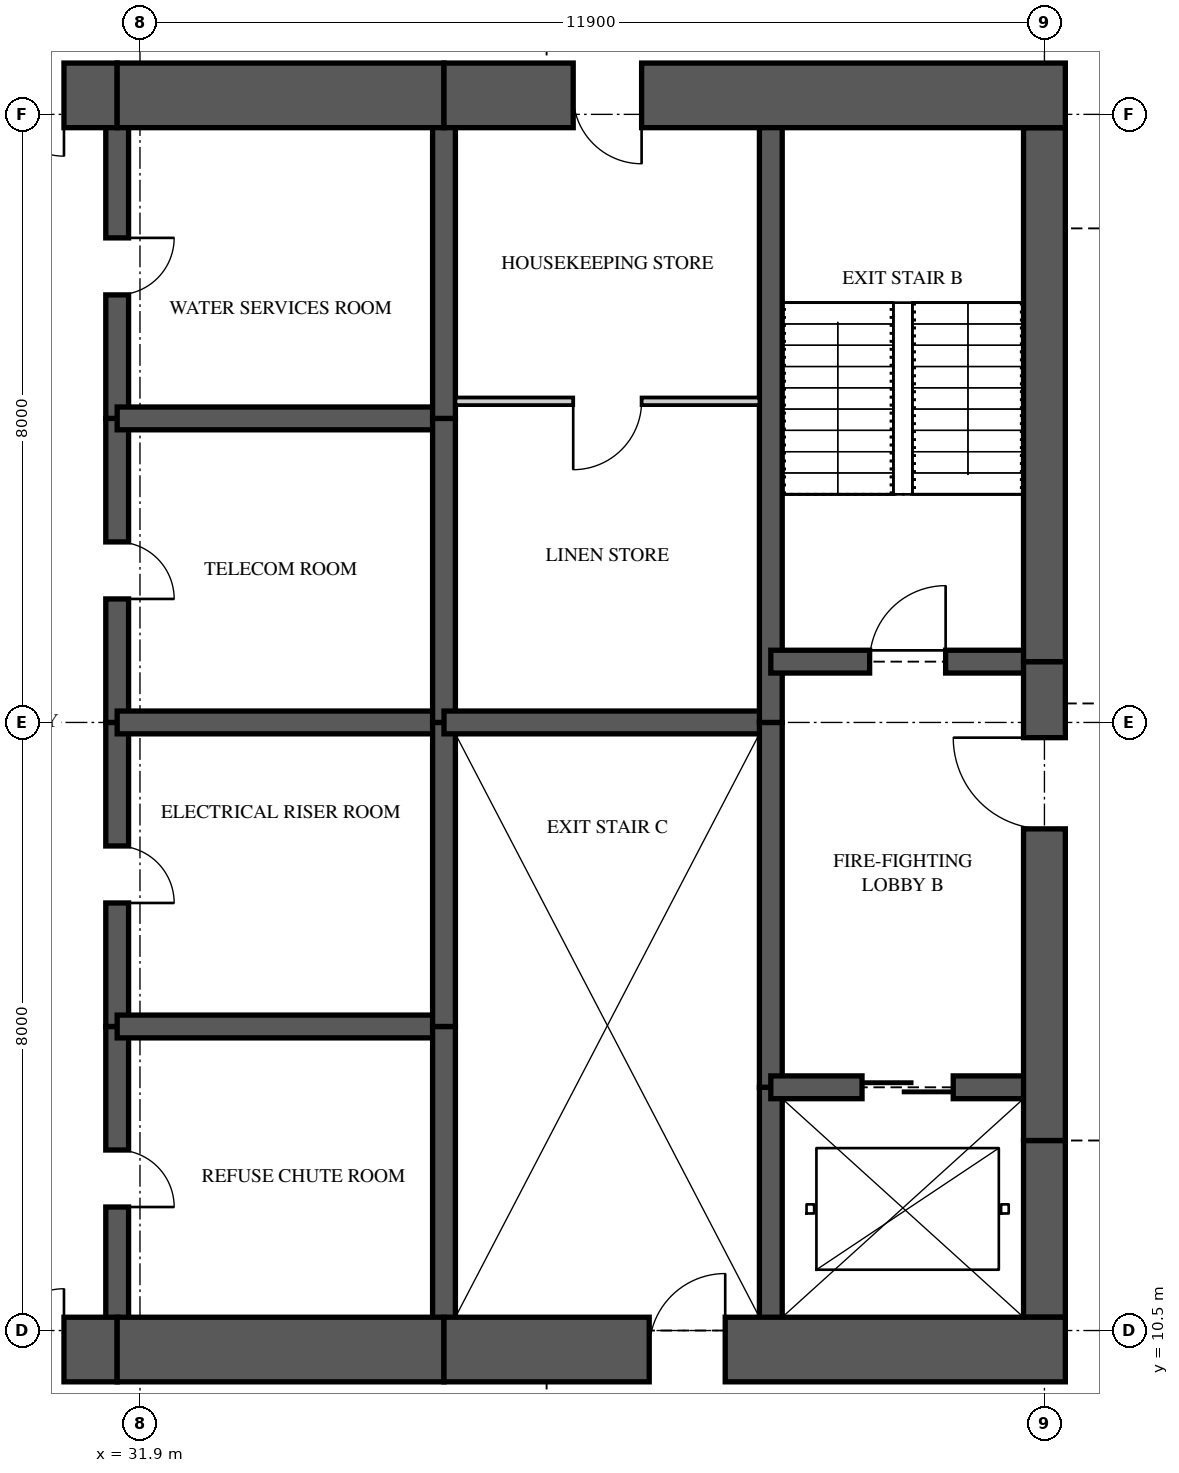
"""IFC4 building model, lengths in metres.
Left out: names, types, materials, properties, quantities, classifications, styles, units other than length and angle.
Written with IfcOpenShell. Run it as: python <this file> out.ifc"""

import sys

from ifc_helpers import new_model, si_unit, direction, frame, frame_2d, origin, place, context, subcontext, project, spatial, rectangle, extrude, element, fill, save


model = new_model("IFC4")
c1 = context("Model", 3, precision=1e-05, world=origin(), true_north=direction((0.0, 1.0)))
c2 = subcontext(c1, "Body", "Model", "MODEL_VIEW")
j1 = project(units=[si_unit("LENGTHUNIT", "METRE"), si_unit("PLANEANGLEUNIT", "RADIAN")], contexts=[c1])
p1 = place(None, origin())
s1 = spatial("IfcSite", under=j1, at=p1, CompositionType="ELEMENT")
p2 = place(p1, origin())
s2 = spatial("IfcBuilding", under=s1, at=p2, CompositionType="ELEMENT")
p3 = place(p2, frame((0.0, 0.0, 272.75)))
s3 = spatial("IfcBuildingStorey", under=s2, at=p3, CompositionType="ELEMENT", Elevation=272.75)
p4 = place(p3, frame((26.0, 10.25, 0.0), z_axis=(0.0, 0.0, 1.0), x_axis=(1.0, 0.0, 0.0)))
e1 = element("IfcWall", 1, at=p4, inside=s3, PredefinedType="SHEAR", context=c2, shape_type="SweptSolid", body=[
    extrude(rectangle(XDim=5.6, YDim=0.85, at=frame_2d((2.8, 0.0))), origin(), (0.0, 0.0, 1.0), 5.0),
])
p5 = place(p4, frame((3.3, 0.0, 0.0)))
e2 = element("IfcOpeningElement", 2, at=p5, cuts=e1, PredefinedType="OPENING", context=c2, shape_type="SweptSolid", body=[
    extrude(rectangle(XDim=1.6, YDim=2.1, at=frame_2d((0.8, 1.05))), frame((0.0, 0.435, 0.0), z_axis=(0.0, -1.0, 0.0), x_axis=(1.0, 0.0, 0.0)), (0.0, 0.0, 1.0), 0.87),
])
p6 = place(p3, frame((31.6, 10.25, 0.0), z_axis=(0.0, 0.0, 1.0), x_axis=(1.0, 0.0, 0.0)))
e3 = element("IfcWall", 3, at=p6, inside=s3, PredefinedType="SHEAR", context=c2, shape_type="SweptSolid", body=[
    extrude(rectangle(XDim=4.3, YDim=0.85, at=frame_2d((2.15, 0.0))), origin(), (0.0, 0.0, 1.0), 5.0),
])
p7 = place(p3, frame((35.9, 10.25, 0.0), z_axis=(0.0, 0.0, 1.0), x_axis=(1.0, 0.0, 0.0)))
e4 = element("IfcWall", 4, at=p7, inside=s3, PredefinedType="SHEAR", context=c2, shape_type="SweptSolid", body=[
    extrude(rectangle(XDim=8.175, YDim=0.85, at=frame_2d((4.087, 0.0))), origin(), (0.0, 0.0, 1.0), 5.0),
])
p8 = place(p7, frame((2.7, 0.0, 0.0)))
e5 = element("IfcOpeningElement", 5, at=p8, cuts=e4, PredefinedType="OPENING", context=c2, shape_type="SweptSolid", body=[
    extrude(rectangle(XDim=1.0, YDim=2.1, at=frame_2d((0.5, 1.05))), frame((0.0, 0.435, 0.0), z_axis=(0.0, -1.0, 0.0), x_axis=(1.0, 0.0, 0.0)), (0.0, 0.0, 1.0), 0.87),
])
p9 = place(p3, frame((44.075, 26.75, 0.0), z_axis=(0.0, 0.0, 1.0), x_axis=(-1.0, 0.0, 0.0)))
e6 = element("IfcWall", 6, at=p9, inside=s3, PredefinedType="SHEAR", context=c2, shape_type="SweptSolid", body=[
    extrude(rectangle(XDim=8.175, YDim=0.85, at=frame_2d((4.087, 0.0))), origin(), (0.0, 0.0, 1.0), 5.0),
])
p10 = place(p9, frame((5.575, 0.0, 0.0)))
e7 = element("IfcOpeningElement", 7, at=p10, cuts=e6, PredefinedType="OPENING", context=c2, shape_type="SweptSolid", body=[
    extrude(rectangle(XDim=0.9, YDim=2.1, at=frame_2d((0.45, 1.05))), frame((0.0, 0.435, 0.0), z_axis=(0.0, -1.0, 0.0), x_axis=(1.0, 0.0, 0.0)), (0.0, 0.0, 1.0), 0.87),
])
p11 = place(p3, frame((35.9, 26.75, 0.0), z_axis=(0.0, 0.0, 1.0), x_axis=(-1.0, 0.0, 0.0)))
e8 = element("IfcWall", 8, at=p11, inside=s3, PredefinedType="SHEAR", context=c2, shape_type="SweptSolid", body=[
    extrude(rectangle(XDim=4.3, YDim=0.85, at=frame_2d((2.15, 0.0))), origin(), (0.0, 0.0, 1.0), 5.0),
])
p12 = place(p3, frame((31.6, 26.75, 0.0), z_axis=(0.0, 0.0, 1.0), x_axis=(-1.0, 0.0, 0.0)))
e9 = element("IfcWall", 9, at=p12, inside=s3, PredefinedType="SHEAR", context=c2, shape_type="SweptSolid", body=[
    extrude(rectangle(XDim=5.6, YDim=0.85, at=frame_2d((2.8, 0.0))), origin(), (0.0, 0.0, 1.0), 5.0),
])
p13 = place(p12, frame((0.7, 0.0, 0.0)))
e10 = element("IfcOpeningElement", 10, at=p13, cuts=e9, PredefinedType="OPENING", context=c2, shape_type="SweptSolid", body=[
    extrude(rectangle(XDim=1.6, YDim=2.1, at=frame_2d((0.8, 1.05))), frame((0.0, 0.435, 0.0), z_axis=(0.0, -1.0, 0.0), x_axis=(1.0, 0.0, 0.0)), (0.0, 0.0, 1.0), 0.87),
])
p14 = place(p3, frame((43.8, 10.675, 0.0), z_axis=(0.0, 0.0, 1.0), x_axis=(0.0, 1.0, 0.0)))
e11 = element("IfcWall", 11, at=p14, inside=s3, PredefinedType="SHEAR", context=c2, shape_type="SweptSolid", body=[
    extrude(rectangle(XDim=2.325, YDim=0.55, at=frame_2d((1.163, 0.0))), origin(), (0.0, 0.0, 1.0), 5.0),
])
p15 = place(p3, frame((43.8, 13.0, 0.0), z_axis=(0.0, 0.0, 1.0), x_axis=(0.0, 1.0, 0.0)))
e12 = element("IfcWall", 12, at=p15, inside=s3, PredefinedType="SHEAR", context=c2, shape_type="SweptSolid", body=[
    extrude(rectangle(XDim=6.3, YDim=0.55, at=frame_2d((3.15, 0.0))), origin(), (0.0, 0.0, 1.0), 5.0),
])
p16 = place(p15, frame((4.1, 0.0, 0.0)))
e13 = element("IfcOpeningElement", 13, at=p16, cuts=e12, PredefinedType="OPENING", context=c2, shape_type="SweptSolid", body=[
    extrude(rectangle(XDim=1.2, YDim=2.2, at=frame_2d((0.6, 1.1))), frame((0.0, 0.285, 0.0), z_axis=(0.0, -1.0, 0.0), x_axis=(1.0, 0.0, 0.0)), (0.0, 0.0, 1.0), 0.57),
])
p17 = place(p3, frame((43.8, 19.3, 0.0), z_axis=(0.0, 0.0, 1.0), x_axis=(0.0, 1.0, 0.0)))
e14 = element("IfcWall", 14, at=p17, inside=s3, PredefinedType="SHEAR", context=c2, shape_type="SweptSolid", body=[
    extrude(rectangle(XDim=7.025, YDim=0.55, at=frame_2d((3.512, 0.0))), origin(), (0.0, 0.0, 1.0), 5.0),
])
p18 = place(p3, frame((31.6, 10.25, 0.0), z_axis=(0.0, 0.0, 1.0), x_axis=(0.0, 1.0, 0.0)))
e15 = element("IfcWall", 15, at=p18, inside=s3, PredefinedType="SHEAR", context=c2, shape_type="SweptSolid", body=[
    extrude(rectangle(XDim=4.25, YDim=0.3, at=frame_2d((2.125, 0.0))), origin(), (0.0, 0.0, 1.0), 5.0),
])
p19 = place(p18, frame((1.875, 0.0, 0.0)))
e16 = element("IfcOpeningElement", 16, at=p19, cuts=e15, PredefinedType="OPENING", context=c2, shape_type="SweptSolid", body=[
    extrude(rectangle(XDim=0.75, YDim=2.1, at=frame_2d((0.375, 1.05))), frame((0.0, 0.16, 0.0), z_axis=(0.0, -1.0, 0.0), x_axis=(1.0, 0.0, 0.0)), (0.0, 0.0, 1.0), 0.32),
])
p20 = place(p3, frame((31.6, 14.5, 0.0), z_axis=(0.0, 0.0, 1.0), x_axis=(0.0, 1.0, 0.0)))
e17 = element("IfcWall", 17, at=p20, inside=s3, PredefinedType="SHEAR", context=c2, shape_type="SweptSolid", body=[
    extrude(rectangle(XDim=4.0, YDim=0.3, at=frame_2d((2.0, 0.0))), origin(), (0.0, 0.0, 1.0), 5.0),
])
p21 = place(p20, frame((1.625, 0.0, 0.0)))
e18 = element("IfcOpeningElement", 18, at=p21, cuts=e17, PredefinedType="OPENING", context=c2, shape_type="SweptSolid", body=[
    extrude(rectangle(XDim=0.75, YDim=2.1, at=frame_2d((0.375, 1.05))), frame((0.0, 0.16, 0.0), z_axis=(0.0, -1.0, 0.0), x_axis=(1.0, 0.0, 0.0)), (0.0, 0.0, 1.0), 0.32),
])
p22 = place(p3, frame((31.6, 18.5, 0.0), z_axis=(0.0, 0.0, 1.0), x_axis=(0.0, 1.0, 0.0)))
e19 = element("IfcWall", 19, at=p22, inside=s3, PredefinedType="SHEAR", context=c2, shape_type="SweptSolid", body=[
    extrude(rectangle(XDim=4.0, YDim=0.3, at=frame_2d((2.0, 0.0))), origin(), (0.0, 0.0, 1.0), 5.0),
])
p23 = place(p22, frame((1.625, 0.0, 0.0)))
e20 = element("IfcOpeningElement", 20, at=p23, cuts=e19, PredefinedType="OPENING", context=c2, shape_type="SweptSolid", body=[
    extrude(rectangle(XDim=0.75, YDim=2.1, at=frame_2d((0.375, 1.05))), frame((0.0, 0.16, 0.0), z_axis=(0.0, -1.0, 0.0), x_axis=(1.0, 0.0, 0.0)), (0.0, 0.0, 1.0), 0.32),
])
p24 = place(p3, frame((31.6, 22.5, 0.0), z_axis=(0.0, 0.0, 1.0), x_axis=(0.0, 1.0, 0.0)))
e21 = element("IfcWall", 21, at=p24, inside=s3, PredefinedType="SHEAR", context=c2, shape_type="SweptSolid", body=[
    extrude(rectangle(XDim=4.25, YDim=0.3, at=frame_2d((2.125, 0.0))), origin(), (0.0, 0.0, 1.0), 5.0),
])
p25 = place(p24, frame((1.625, 0.0, 0.0)))
e22 = element("IfcOpeningElement", 22, at=p25, cuts=e21, PredefinedType="OPENING", context=c2, shape_type="SweptSolid", body=[
    extrude(rectangle(XDim=0.75, YDim=2.1, at=frame_2d((0.375, 1.05))), frame((0.0, 0.16, 0.0), z_axis=(0.0, -1.0, 0.0), x_axis=(1.0, 0.0, 0.0)), (0.0, 0.0, 1.0), 0.32),
])
p26 = place(p3, frame((35.9, 10.25, 0.0), z_axis=(0.0, 0.0, 1.0), x_axis=(0.0, 1.0, 0.0)))
e23 = element("IfcWall", 23, at=p26, inside=s3, PredefinedType="SHEAR", context=c2, shape_type="SweptSolid", body=[
    extrude(rectangle(XDim=4.25, YDim=0.3, at=frame_2d((2.125, 0.0))), origin(), (0.0, 0.0, 1.0), 5.0),
])
for number, where, z_axis, x_axis in (
    (24, (35.9, 14.5, 0.0), (0.0, 0.0, 1.0), (0.0, 1.0, 0.0)),
    (25, (35.9, 18.5, 0.0), (0.0, 0.0, 1.0), (0.0, 1.0, 0.0)),
):
    element("IfcWall", number, at=place(p3, frame(where, z_axis=z_axis, x_axis=x_axis)), inside=s3, PredefinedType="SHEAR", context=c2, shape_type="SweptSolid", body=[
        extrude(rectangle(XDim=4.0, YDim=0.3, at=frame_2d((2.0, 0.0))), origin(), (0.0, 0.0, 1.0), 5.0),
    ])
p27 = place(p3, frame((35.9, 22.5, 0.0), z_axis=(0.0, 0.0, 1.0), x_axis=(0.0, 1.0, 0.0)))
e26 = element("IfcWall", 26, at=p27, inside=s3, PredefinedType="SHEAR", context=c2, shape_type="SweptSolid", body=[
    extrude(rectangle(XDim=4.25, YDim=0.3, at=frame_2d((2.125, 0.0))), origin(), (0.0, 0.0, 1.0), 5.0),
])
p28 = place(p3, frame((40.2, 10.25, 0.0), z_axis=(0.0, 0.0, 1.0), x_axis=(0.0, 1.0, 0.0)))
e27 = element("IfcWall", 27, at=p28, inside=s3, PredefinedType="SHEAR", context=c2, shape_type="SweptSolid", body=[
    extrude(rectangle(XDim=3.45, YDim=0.3, at=frame_2d((1.725, 0.0))), origin(), (0.0, 0.0, 1.0), 5.0),
])
p29 = place(p3, frame((40.2, 13.7, 0.0), z_axis=(0.0, 0.0, 1.0), x_axis=(0.0, 1.0, 0.0)))
e28 = element("IfcWall", 28, at=p29, inside=s3, PredefinedType="SHEAR", context=c2, shape_type="SweptSolid", body=[
    extrude(rectangle(XDim=4.8, YDim=0.3, at=frame_2d((2.4, 0.0))), origin(), (0.0, 0.0, 1.0), 5.0),
])
p30 = place(p3, frame((40.2, 18.5, 0.0), z_axis=(0.0, 0.0, 1.0), x_axis=(0.0, 1.0, 0.0)))
e29 = element("IfcWall", 29, at=p30, inside=s3, PredefinedType="SHEAR", context=c2, shape_type="SweptSolid", body=[
    extrude(rectangle(XDim=8.25, YDim=0.3, at=frame_2d((4.125, 0.0))), origin(), (0.0, 0.0, 1.0), 5.0),
])
for number, where, z_axis, x_axis in (
    (30, (31.6, 14.5, 0.0), (0.0, 0.0, 1.0), (1.0, 0.0, 0.0)),
    (31, (31.6, 18.5, 0.0), (0.0, 0.0, 1.0), (1.0, 0.0, 0.0)),
    (32, (31.6, 22.5, 0.0), (0.0, 0.0, 1.0), (1.0, 0.0, 0.0)),
):
    element("IfcWall", number, at=place(p3, frame(where, z_axis=z_axis, x_axis=x_axis)), inside=s3, PredefinedType="SHEAR", context=c2, shape_type="SweptSolid", body=[
        extrude(rectangle(XDim=4.3, YDim=0.3, at=frame_2d((2.15, 0.0))), origin(), (0.0, 0.0, 1.0), 5.0),
    ])
p31 = place(p3, frame((35.9, 18.5, 0.0), z_axis=(0.0, 0.0, 1.0), x_axis=(1.0, 0.0, 0.0)))
e33 = element("IfcWall", 33, at=p31, inside=s3, PredefinedType="SHEAR", context=c2, shape_type="SweptSolid", body=[
    extrude(rectangle(XDim=4.3, YDim=0.3, at=frame_2d((2.15, 0.0))), origin(), (0.0, 0.0, 1.0), 5.0),
])
p32 = place(p3, frame((40.2, 13.7, 0.0), z_axis=(0.0, 0.0, 1.0), x_axis=(1.0, 0.0, 0.0)))
e34 = element("IfcWall", 34, at=p32, inside=s3, PredefinedType="SHEAR", context=c2, shape_type="SweptSolid", body=[
    extrude(rectangle(XDim=3.6, YDim=0.3, at=frame_2d((1.8, 0.0))), origin(), (0.0, 0.0, 1.0), 5.0),
])
p33 = place(p32, frame((1.2, 0.0, 0.0)))
e35 = element("IfcOpeningElement", 35, at=p33, cuts=e34, PredefinedType="OPENING", context=c2, shape_type="SweptSolid", body=[
    extrude(rectangle(XDim=1.2, YDim=2.1, at=frame_2d((0.6, 1.05))), frame((0.0, 0.16, 0.0), z_axis=(0.0, -1.0, 0.0), x_axis=(1.0, 0.0, 0.0)), (0.0, 0.0, 1.0), 0.32),
])
p34 = place(p3, frame((40.2, 19.3, 0.0), z_axis=(0.0, 0.0, 1.0), x_axis=(1.0, 0.0, 0.0)))
e36 = element("IfcWall", 36, at=p34, inside=s3, PredefinedType="SHEAR", context=c2, shape_type="SweptSolid", body=[
    extrude(rectangle(XDim=3.6, YDim=0.3, at=frame_2d((1.8, 0.0))), origin(), (0.0, 0.0, 1.0), 5.0),
])
p35 = place(p34, frame((1.3, 0.0, 0.0)))
e37 = element("IfcOpeningElement", 37, at=p35, cuts=e36, PredefinedType="OPENING", context=c2, shape_type="SweptSolid", body=[
    extrude(rectangle(XDim=1.0, YDim=2.1, at=frame_2d((0.5, 1.05))), frame((0.0, 0.16, 0.0), z_axis=(0.0, -1.0, 0.0), x_axis=(1.0, 0.0, 0.0)), (0.0, 0.0, 1.0), 0.32),
])
p36 = place(p3, frame((36.05, 22.725, 0.0), z_axis=(0.0, 0.0, 1.0), x_axis=(1.0, 0.0, 0.0)))
e38 = element("IfcWall", 38, at=p36, inside=s3, PredefinedType="PARTITIONING", context=c2, shape_type="SweptSolid", body=[
    extrude(rectangle(XDim=4.0, YDim=0.1, at=frame_2d((2.0, 0.0))), origin(), (0.0, 0.0, 1.0), 4.72),
])
p37 = place(p36, frame((1.55, 0.0, 0.0)))
e39 = element("IfcOpeningElement", 39, at=p37, cuts=e38, PredefinedType="OPENING", context=c2, shape_type="SweptSolid", body=[
    extrude(rectangle(XDim=0.9, YDim=2.1, at=frame_2d((0.45, 1.05))), frame((0.0, 0.06, 0.0), z_axis=(0.0, -1.0, 0.0), x_axis=(1.0, 0.0, 0.0)), (0.0, 0.0, 1.0), 0.12),
])
p38 = place(p37, frame((0.9, 0.0, 0.0), z_axis=(0.0, 0.0, 1.0), x_axis=(-1.0, 0.0, 0.0)))
e40 = element("IfcDoor", 40, at=p38, inside=s3, OperationType="SINGLE_SWING_RIGHT", PredefinedType="DOOR", context=c2, shape_type="SweptSolid", body=[
    extrude(rectangle(XDim=0.9, YDim=2.1, at=frame_2d((0.45, 1.05))), frame((0.0, 0.025, 0.0), z_axis=(0.0, -1.0, 0.0), x_axis=(1.0, 0.0, 0.0)), (0.0, 0.0, 1.0), 0.05),
])
fill(e39, e40)
p39 = place(p35, origin())
e41 = element("IfcDoor", 41, at=p39, inside=s3, OperationType="SINGLE_SWING_RIGHT", PredefinedType="DOOR", context=c2, shape_type="SweptSolid", body=[
    extrude(rectangle(XDim=1.0, YDim=2.1, at=frame_2d((0.5, 1.05))), frame((0.0, 0.025, 0.0), z_axis=(0.0, -1.0, 0.0), x_axis=(1.0, 0.0, 0.0)), (0.0, 0.0, 1.0), 0.05),
])
fill(e37, e41)
p40 = place(p16, origin())
e42 = element("IfcDoor", 42, at=p40, inside=s3, OperationType="SINGLE_SWING_RIGHT", PredefinedType="DOOR", context=c2, shape_type="SweptSolid", body=[
    extrude(rectangle(XDim=1.2, YDim=2.2, at=frame_2d((0.6, 1.1))), frame((0.0, 0.025, 0.0), z_axis=(0.0, -1.0, 0.0), x_axis=(1.0, 0.0, 0.0)), (0.0, 0.0, 1.0), 0.05),
])
fill(e13, e42)
p41 = place(p33, origin())
e43 = element("IfcDoor", 43, at=p41, inside=s3, OperationType="SLIDING_TO_LEFT", PredefinedType="DOOR", context=c2, shape_type="SweptSolid", body=[
    extrude(rectangle(XDim=1.2, YDim=2.1, at=frame_2d((0.6, 1.05))), frame((0.0, 0.025, 0.0), z_axis=(0.0, -1.0, 0.0), x_axis=(1.0, 0.0, 0.0)), (0.0, 0.0, 1.0), 0.05),
])
fill(e35, e43)
p42 = place(p5, origin())
e44 = element("IfcDoor", 44, at=p42, inside=s3, OperationType="DOUBLE_DOOR_SINGLE_SWING", PredefinedType="DOOR", context=c2, shape_type="SweptSolid", body=[
    extrude(rectangle(XDim=1.6, YDim=2.1, at=frame_2d((0.8, 1.05))), frame((0.0, 0.025, 0.0), z_axis=(0.0, -1.0, 0.0), x_axis=(1.0, 0.0, 0.0)), (0.0, 0.0, 1.0), 0.05),
])
fill(e2, e44)
p43 = place(p13, origin())
e45 = element("IfcDoor", 45, at=p43, inside=s3, OperationType="DOUBLE_DOOR_SINGLE_SWING", PredefinedType="DOOR", context=c2, shape_type="SweptSolid", body=[
    extrude(rectangle(XDim=1.6, YDim=2.1, at=frame_2d((0.8, 1.05))), frame((0.0, 0.025, 0.0), z_axis=(0.0, -1.0, 0.0), x_axis=(1.0, 0.0, 0.0)), (0.0, 0.0, 1.0), 0.05),
])
fill(e10, e45)
p44 = place(p19, frame((0.75, 0.0, 0.0), z_axis=(0.0, 0.0, 1.0), x_axis=(-1.0, 0.0, 0.0)))
e46 = element("IfcDoor", 46, at=p44, inside=s3, OperationType="SINGLE_SWING_RIGHT", PredefinedType="DOOR", context=c2, shape_type="SweptSolid", body=[
    extrude(rectangle(XDim=0.75, YDim=2.1, at=frame_2d((0.375, 1.05))), frame((0.0, 0.025, 0.0), z_axis=(0.0, -1.0, 0.0), x_axis=(1.0, 0.0, 0.0)), (0.0, 0.0, 1.0), 0.05),
])
fill(e16, e46)
p45 = place(p21, frame((0.75, 0.0, 0.0), z_axis=(0.0, 0.0, 1.0), x_axis=(-1.0, 0.0, 0.0)))
e47 = element("IfcDoor", 47, at=p45, inside=s3, OperationType="SINGLE_SWING_RIGHT", PredefinedType="DOOR", context=c2, shape_type="SweptSolid", body=[
    extrude(rectangle(XDim=0.75, YDim=2.1, at=frame_2d((0.375, 1.05))), frame((0.0, 0.025, 0.0), z_axis=(0.0, -1.0, 0.0), x_axis=(1.0, 0.0, 0.0)), (0.0, 0.0, 1.0), 0.05),
])
fill(e18, e47)
p46 = place(p23, frame((0.75, 0.0, 0.0), z_axis=(0.0, 0.0, 1.0), x_axis=(-1.0, 0.0, 0.0)))
e48 = element("IfcDoor", 48, at=p46, inside=s3, OperationType="SINGLE_SWING_RIGHT", PredefinedType="DOOR", context=c2, shape_type="SweptSolid", body=[
    extrude(rectangle(XDim=0.75, YDim=2.1, at=frame_2d((0.375, 1.05))), frame((0.0, 0.025, 0.0), z_axis=(0.0, -1.0, 0.0), x_axis=(1.0, 0.0, 0.0)), (0.0, 0.0, 1.0), 0.05),
])
fill(e20, e48)
p47 = place(p25, frame((0.75, 0.0, 0.0), z_axis=(0.0, 0.0, 1.0), x_axis=(-1.0, 0.0, 0.0)))
e49 = element("IfcDoor", 49, at=p47, inside=s3, OperationType="SINGLE_SWING_LEFT", PredefinedType="DOOR", context=c2, shape_type="SweptSolid", body=[
    extrude(rectangle(XDim=0.75, YDim=2.1, at=frame_2d((0.375, 1.05))), frame((0.0, 0.025, 0.0), z_axis=(0.0, -1.0, 0.0), x_axis=(1.0, 0.0, 0.0)), (0.0, 0.0, 1.0), 0.05),
])
fill(e22, e49)
p48 = place(p8, origin())
e50 = element("IfcDoor", 50, at=p48, inside=s3, OperationType="SINGLE_SWING_RIGHT", PredefinedType="DOOR", context=c2, shape_type="SweptSolid", body=[
    extrude(rectangle(XDim=1.0, YDim=2.1, at=frame_2d((0.5, 1.05))), frame((0.0, 0.025, 0.0), z_axis=(0.0, -1.0, 0.0), x_axis=(1.0, 0.0, 0.0)), (0.0, 0.0, 1.0), 0.05),
])
fill(e5, e50)
p49 = place(p10, origin())
e51 = element("IfcDoor", 51, at=p49, inside=s3, OperationType="SINGLE_SWING_LEFT", PredefinedType="DOOR", context=c2, shape_type="SweptSolid", body=[
    extrude(rectangle(XDim=0.9, YDim=2.1, at=frame_2d((0.45, 1.05))), frame((0.0, 0.415, 0.0), z_axis=(0.0, -1.0, 0.0), x_axis=(1.0, 0.0, 0.0)), (0.0, 0.0, 1.0), 0.8),
])
fill(e7, e51)
save(model, sys.argv[1])
